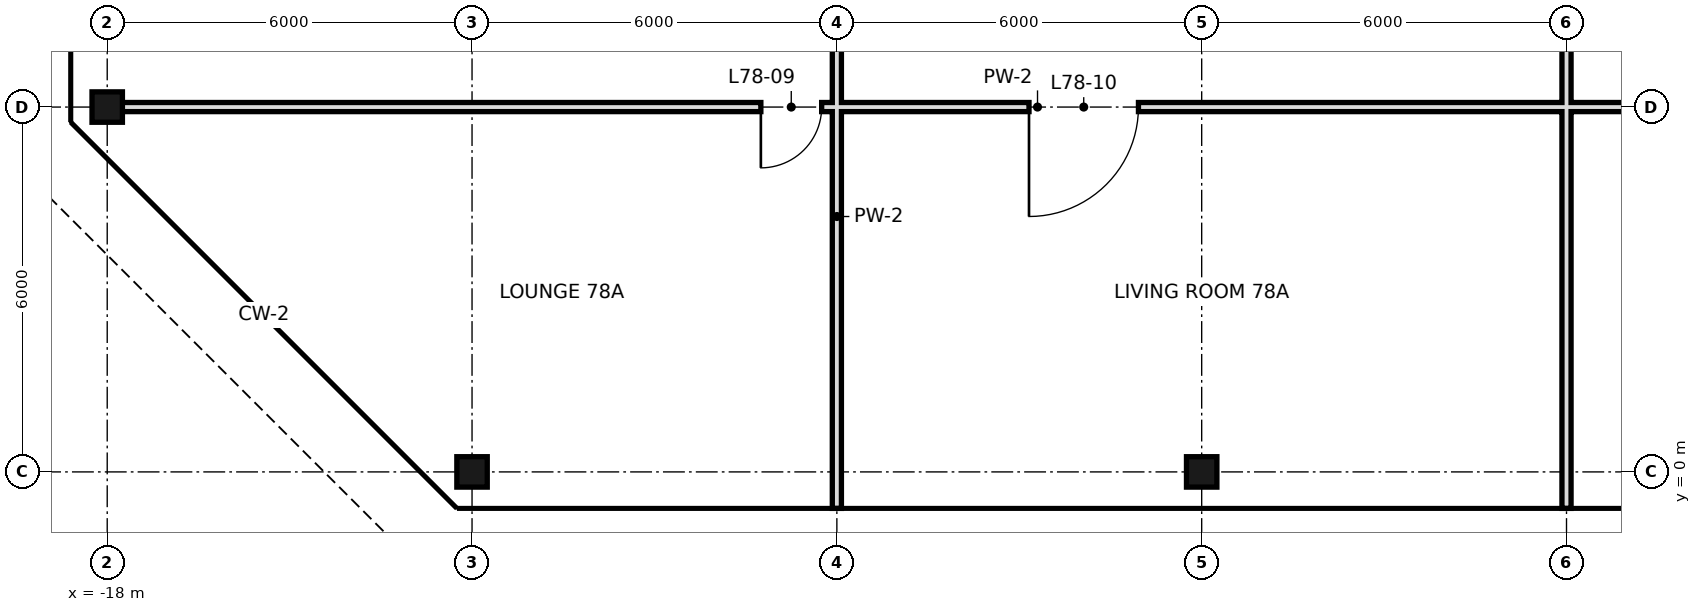
"""IFC4 building model, lengths in metres.
Left out: names, types, materials, properties, quantities, classifications, styles, units other than length and angle.
Written with IfcOpenShell. Run it as: python <this file> out.ifc"""

import sys

from ifc_helpers import new_model, si_unit, direction, frame, frame_2d, origin, origin_2d, place, context, subcontext, project, spatial, rectangle, hollow_rectangle, extrude, element, fill, save


model = new_model("IFC4")
c1 = context("Model", 3, precision=1e-05, world=origin(), true_north=direction((0.0, 1.0)))
c2 = subcontext(c1, "Body", "Model", "MODEL_VIEW")
j1 = project(units=[si_unit("LENGTHUNIT", "METRE"), si_unit("PLANEANGLEUNIT", "RADIAN")], contexts=[c1])
p1 = place(None, origin())
s1 = spatial("IfcSite", under=j1, at=p1, CompositionType="ELEMENT")
p2 = place(p1, origin())
s2 = spatial("IfcBuilding", under=s1, at=p2, CompositionType="ELEMENT")
p3 = place(p2, frame((0.0, 0.0, 326.8)))
s3 = spatial("IfcBuildingStorey", under=s2, at=p3, CompositionType="ELEMENT", Elevation=326.8)
for number, where, z_axis, x_axis in (
    (1, (-18.0, 6.0, 0.0), (0.0, 0.0, 1.0), (1.0, 0.0, 0.0)),
    (2, (-12.0, 0.0, 0.0), (0.0, 0.0, 1.0), (1.0, 0.0, 0.0)),
    (3, (0.0, 0.0, 0.0), (0.0, 0.0, 1.0), (1.0, 0.0, 0.0)),
):
    element("IfcColumn", number, at=place(p3, frame(where, z_axis=z_axis, x_axis=x_axis)), inside=s3, PredefinedType="COLUMN", context=c2, shape_type="SweptSolid", body=[
        extrude(hollow_rectangle(XDim=0.5, YDim=0.5, WallThickness=0.025, at=origin_2d()), origin(), (0.0, 0.0, 1.0), 4.4),
    ])
p4 = place(p3, frame((-6.0, -0.6, 0.0), z_axis=(0.0, 0.0, 1.0), x_axis=(0.0, 1.0, 0.0)))
e4 = element("IfcWall", 4, at=p4, inside=s3, PredefinedType="PARTITIONING", context=c2, shape_type="SweptSolid", body=[
    extrude(rectangle(XDim=9.6, YDim=0.15, at=frame_2d((4.8, 0.0))), origin(), (0.0, 0.0, 1.0), 4.1),
])
p5 = place(p3, frame((6.0, -0.6, 0.0), z_axis=(0.0, 0.0, 1.0), x_axis=(0.0, 1.0, 0.0)))
e5 = element("IfcWall", 5, at=p5, inside=s3, PredefinedType="PARTITIONING", context=c2, shape_type="SweptSolid", body=[
    extrude(rectangle(XDim=6.6, YDim=0.15, at=frame_2d((3.3, 0.0))), origin(), (0.0, 0.0, 1.0), 3.4),
])
p6 = place(p3, frame((6.0, 6.0, 0.0), z_axis=(0.0, 0.0, 1.0), x_axis=(0.0, 1.0, 0.0)))
e6 = element("IfcWall", 6, at=p6, inside=s3, PredefinedType="PARTITIONING", context=c2, shape_type="SweptSolid", body=[
    extrude(rectangle(XDim=3.0, YDim=0.15, at=frame_2d((1.5, 0.0))), origin(), (0.0, 0.0, 1.0), 3.4),
])
p7 = place(p3, frame((-18.0, 6.0, 0.0), z_axis=(0.0, 0.0, 1.0), x_axis=(1.0, 0.0, 0.0)))
e7 = element("IfcWall", 7, at=p7, inside=s3, PredefinedType="PARTITIONING", context=c2, shape_type="SweptSolid", body=[
    extrude(rectangle(XDim=24.0, YDim=0.15, at=frame_2d((12.0, 0.0))), origin(), (0.0, 0.0, 1.0), 3.4),
])
p8 = place(p7, frame((10.75, 0.0, 0.0)))
e8 = element("IfcOpeningElement", 8, at=p8, cuts=e7, PredefinedType="OPENING", context=c2, shape_type="SweptSolid", body=[
    extrude(rectangle(XDim=1.0, YDim=2.4, at=frame_2d((0.5, 1.2))), frame((0.0, 0.085, 0.0), z_axis=(0.0, -1.0, 0.0), x_axis=(1.0, 0.0, 0.0)), (0.0, 0.0, 1.0), 0.17),
])
p9 = place(p7, frame((15.16, 0.0, 0.0)))
e9 = element("IfcOpeningElement", 9, at=p9, cuts=e7, PredefinedType="OPENING", context=c2, shape_type="SweptSolid", body=[
    extrude(rectangle(XDim=1.8, YDim=2.4, at=frame_2d((0.9, 1.2))), frame((0.0, 0.085, 0.0), z_axis=(0.0, -1.0, 0.0), x_axis=(1.0, 0.0, 0.0)), (0.0, 0.0, 1.0), 0.17),
])
p10 = place(p3, frame((6.0, 6.0, 0.0), z_axis=(0.0, 0.0, 1.0), x_axis=(1.0, 0.0, 0.0)))
e10 = element("IfcWall", 10, at=p10, inside=s3, PredefinedType="PARTITIONING", context=c2, shape_type="SweptSolid", body=[
    extrude(rectangle(XDim=3.0, YDim=0.15, at=frame_2d((1.5, 0.0))), origin(), (0.0, 0.0, 1.0), 3.65),
])
p11 = place(p10, frame((1.37, 0.0, 0.0)))
e11 = element("IfcOpeningElement", 11, at=p11, cuts=e10, PredefinedType="OPENING", context=c2, shape_type="SweptSolid", body=[
    extrude(rectangle(XDim=0.9, YDim=2.4, at=frame_2d((0.45, 1.2))), frame((0.0, 0.085, 0.0), z_axis=(0.0, -1.0, 0.0), x_axis=(1.0, 0.0, 0.0)), (0.0, 0.0, 1.0), 0.17),
])
p12 = place(p8, frame((1.0, 0.0, 0.0), z_axis=(0.0, 0.0, 1.0), x_axis=(-1.0, 0.0, 0.0)))
e12 = element("IfcDoor", 12, at=p12, inside=s3, OperationType="SINGLE_SWING_RIGHT", PredefinedType="DOOR", context=c2, shape_type="SweptSolid", body=[
    extrude(rectangle(XDim=1.0, YDim=2.4, at=frame_2d((0.5, 1.2))), frame((0.0, 0.025, 0.0), z_axis=(0.0, -1.0, 0.0), x_axis=(1.0, 0.0, 0.0)), (0.0, 0.0, 1.0), 0.05),
])
fill(e8, e12)
p13 = place(p9, frame((1.8, 0.0, 0.0), z_axis=(0.0, 0.0, 1.0), x_axis=(-1.0, 0.0, 0.0)))
e13 = element("IfcDoor", 13, at=p13, inside=s3, OperationType="SINGLE_SWING_RIGHT", PredefinedType="DOOR", context=c2, shape_type="SweptSolid", body=[
    extrude(rectangle(XDim=1.8, YDim=2.4, at=frame_2d((0.9, 1.2))), frame((0.0, 0.025, 0.0), z_axis=(0.0, -1.0, 0.0), x_axis=(1.0, 0.0, 0.0)), (0.0, 0.0, 1.0), 0.05),
])
fill(e9, e13)
save(model, sys.argv[1])
